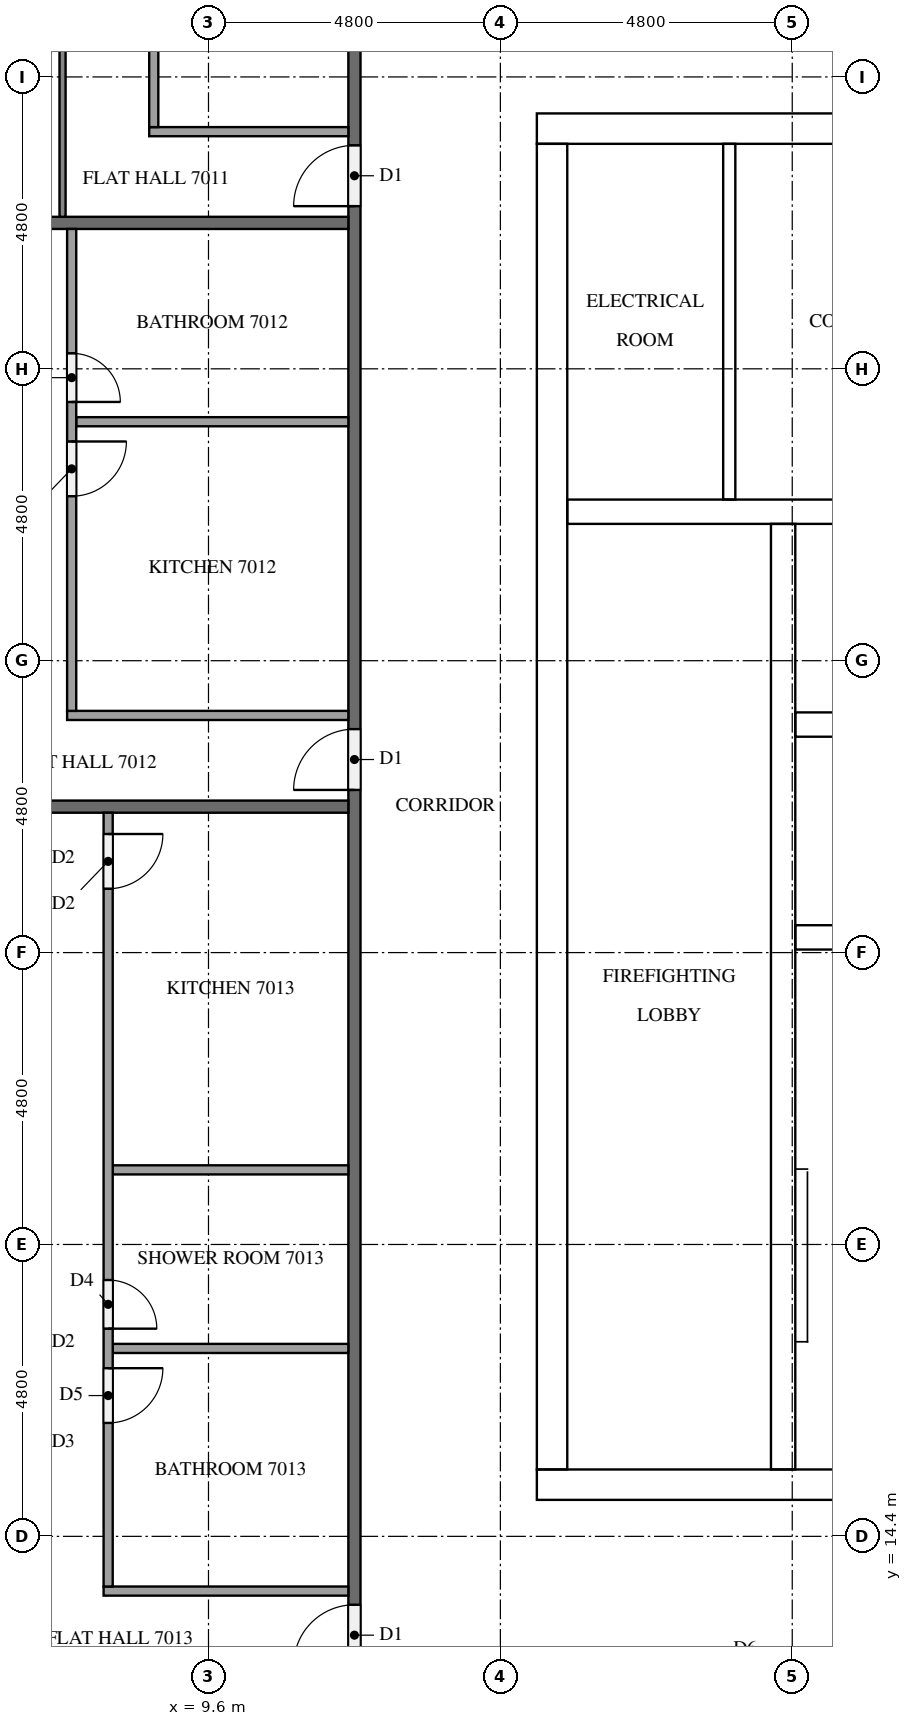
"""IFC4 building model, lengths in metres.
Left out: names, types, materials, properties, quantities, classifications, styles, units other than length and angle.
Written with IfcOpenShell. Run it as: python <this file> out.ifc"""

import sys

from ifc_helpers import new_model, si_unit, direction, frame, frame_2d, origin, place, context, subcontext, project, spatial, rectangle, extrude, element, fill, save


model = new_model("IFC4")
c1 = context("Model", 3, precision=1e-05, world=origin(), true_north=direction((0.0, 1.0)))
c2 = subcontext(c1, "Body", "Model", "MODEL_VIEW")
j1 = project(units=[si_unit("LENGTHUNIT", "METRE"), si_unit("PLANEANGLEUNIT", "RADIAN")], contexts=[c1])
p1 = place(None, origin())
s1 = spatial("IfcSite", under=j1, at=p1, CompositionType="ELEMENT")
p2 = place(p1, origin())
s2 = spatial("IfcBuilding", under=s1, at=p2, CompositionType="ELEMENT")
p3 = place(p2, frame((0.0, 0.0, 268.6)))
s3 = spatial("IfcBuildingStorey", under=s2, at=p3, CompositionType="ELEMENT", Elevation=268.6)
p4 = place(p3, frame((15.0, 15.25, 0.0), z_axis=(0.0, 0.0, 1.0), x_axis=(1.0, 0.0, 0.0)))
e1 = element("IfcWall", 1, at=p4, inside=s3, PredefinedType="SHEAR", context=c2, shape_type="SweptSolid", body=[
    extrude(rectangle(XDim=32.4, YDim=0.5, at=frame_2d((16.2, 0.0))), origin(), (0.0, 0.0, 1.0), 3.2),
])
p5 = place(p4, frame((15.3, 0.0, 0.0)))
e2 = element("IfcOpeningElement", 2, at=p5, cuts=e1, PredefinedType="OPENING", context=c2, shape_type="SweptSolid", body=[
    extrude(rectangle(XDim=1.8, YDim=2.1, at=frame_2d((0.9, 1.05))), frame((0.0, 0.26, 0.0), z_axis=(0.0, -1.0, 0.0), x_axis=(1.0, 0.0, 0.0)), (0.0, 0.0, 1.0), 0.52),
])
p6 = place(p3, frame((15.0, 37.55, 0.0), z_axis=(0.0, 0.0, 1.0), x_axis=(1.0, 0.0, 0.0)))
e3 = element("IfcWall", 3, at=p6, inside=s3, PredefinedType="SHEAR", context=c2, shape_type="SweptSolid", body=[
    extrude(rectangle(XDim=32.4, YDim=0.5, at=frame_2d((16.2, 0.0))), origin(), (0.0, 0.0, 1.0), 3.2),
])
p7 = place(p6, frame((15.3, 0.0, 0.0)))
e4 = element("IfcOpeningElement", 4, at=p7, cuts=e3, PredefinedType="OPENING", context=c2, shape_type="SweptSolid", body=[
    extrude(rectangle(XDim=1.8, YDim=2.1, at=frame_2d((0.9, 1.05))), frame((0.0, 0.26, 0.0), z_axis=(0.0, -1.0, 0.0), x_axis=(1.0, 0.0, 0.0)), (0.0, 0.0, 1.0), 0.52),
])
p8 = place(p6, frame((1.282, 0.0, 0.0)))
e5 = element("IfcOpeningElement", 5, at=p8, cuts=e3, PredefinedType="OPENING", context=c2, shape_type="SweptSolid", body=[
    extrude(rectangle(XDim=1.0, YDim=2.1, at=frame_2d((0.5, 1.05))), frame((0.0, 0.26, 0.0), z_axis=(0.0, -1.0, 0.0), x_axis=(1.0, 0.0, 0.0)), (0.0, 0.0, 1.0), 0.52),
])
p9 = place(p6, frame((5.082, 0.0, 0.0)))
e6 = element("IfcOpeningElement", 6, at=p9, cuts=e3, PredefinedType="OPENING", context=c2, shape_type="SweptSolid", body=[
    extrude(rectangle(XDim=1.0, YDim=2.1, at=frame_2d((0.5, 1.05))), frame((0.0, 0.26, 0.0), z_axis=(0.0, -1.0, 0.0), x_axis=(1.0, 0.0, 0.0)), (0.0, 0.0, 1.0), 0.52),
])
p10 = place(p3, frame((15.25, 15.5, 0.0), z_axis=(0.0, 0.0, 1.0), x_axis=(0.0, 1.0, 0.0)))
e7 = element("IfcWall", 7, at=p10, inside=s3, PredefinedType="SHEAR", context=c2, shape_type="SweptSolid", body=[
    extrude(rectangle(XDim=21.8, YDim=0.5, at=frame_2d((10.9, 0.0))), origin(), (0.0, 0.0, 1.0), 3.2),
])
p11 = place(p10, frame((5.26, 0.0, 0.0)))
e8 = element("IfcOpeningElement", 8, at=p11, cuts=e7, PredefinedType="OPENING", context=c2, shape_type="SweptSolid", body=[
    extrude(rectangle(XDim=1.2, YDim=2.1, at=frame_2d((0.6, 1.05))), frame((0.0, 0.26, 0.0), z_axis=(0.0, -1.0, 0.0), x_axis=(1.0, 0.0, 0.0)), (0.0, 0.0, 1.0), 0.52),
])
p12 = place(p3, frame((19.05, 15.5, 0.0), z_axis=(0.0, 0.0, 1.0), x_axis=(0.0, 1.0, 0.0)))
e9 = element("IfcWall", 9, at=p12, inside=s3, PredefinedType="SHEAR", context=c2, shape_type="SweptSolid", body=[
    extrude(rectangle(XDim=15.55, YDim=0.4, at=frame_2d((7.775, 0.0))), origin(), (0.0, 0.0, 1.0), 3.2),
])
p13 = place(p12, frame((9.95, 0.0, 0.0)))
e10 = element("IfcOpeningElement", 10, at=p13, cuts=e9, PredefinedType="OPENING", context=c2, shape_type="SweptSolid", body=[
    extrude(rectangle(XDim=1.1, YDim=2.1, at=frame_2d((0.55, 1.05))), frame((0.0, 0.21, 0.0), z_axis=(0.0, -1.0, 0.0), x_axis=(1.0, 0.0, 0.0)), (0.0, 0.0, 1.0), 0.42),
])
p14 = place(p12, frame((13.45, 0.0, 0.0)))
e11 = element("IfcOpeningElement", 11, at=p14, cuts=e9, PredefinedType="OPENING", context=c2, shape_type="SweptSolid", body=[
    extrude(rectangle(XDim=1.1, YDim=2.1, at=frame_2d((0.55, 1.05))), frame((0.0, 0.21, 0.0), z_axis=(0.0, -1.0, 0.0), x_axis=(1.0, 0.0, 0.0)), (0.0, 0.0, 1.0), 0.42),
])
p15 = place(p12, frame((0.7, 0.0, 0.0)))
e12 = element("IfcOpeningElement", 12, at=p15, cuts=e9, PredefinedType="OPENING", context=c2, shape_type="SweptSolid", body=[
    extrude(rectangle(XDim=1.2, YDim=2.1, at=frame_2d((0.6, 1.05))), frame((0.0, 0.21, 0.0), z_axis=(0.0, -1.0, 0.0), x_axis=(1.0, 0.0, 0.0)), (0.0, 0.0, 1.0), 0.42),
])
for number, where, z_axis, x_axis in (
    (13, (19.25, 24.25, 0.0), (0.0, 0.0, 1.0), (1.0, 0.0, 0.0)),
    (14, (19.25, 27.75, 0.0), (0.0, 0.0, 1.0), (1.0, 0.0, 0.0)),
):
    element("IfcWall", number, at=place(p3, frame(where, z_axis=z_axis, x_axis=x_axis)), inside=s3, PredefinedType="SHEAR", context=c2, shape_type="SweptSolid", body=[
        extrude(rectangle(XDim=3.65, YDim=0.4, at=frame_2d((1.825, 0.0))), origin(), (0.0, 0.0, 1.0), 3.2),
    ])
p16 = place(p3, frame((15.5, 31.25, 0.0), z_axis=(0.0, 0.0, 1.0), x_axis=(1.0, 0.0, 0.0)))
e15 = element("IfcWall", 15, at=p16, inside=s3, PredefinedType="SHEAR", context=c2, shape_type="SweptSolid", body=[
    extrude(rectangle(XDim=7.4, YDim=0.4, at=frame_2d((3.7, 0.0))), origin(), (0.0, 0.0, 1.0), 3.2),
])
p17 = place(p3, frame((18.164, 31.45, 0.0), z_axis=(0.0, 0.0, 1.0), x_axis=(0.0, 1.0, 0.0)))
e16 = element("IfcWall", 16, at=p17, inside=s3, PredefinedType="PARTITIONING", context=c2, shape_type="SweptSolid", body=[
    extrude(rectangle(XDim=5.85, YDim=0.2, at=frame_2d((2.925, 0.0))), origin(), (0.0, 0.0, 1.0), 3.2),
])
p18 = place(p3, frame((12.0, 12.1, 0.0), z_axis=(0.0, 0.0, 1.0), x_axis=(0.0, 1.0, 0.0)))
e17 = element("IfcWall", 17, at=p18, inside=s3, PredefinedType="PARTITIONING", context=c2, shape_type="SweptSolid", body=[
    extrude(rectangle(XDim=28.6, YDim=0.2, at=frame_2d((14.3, 0.0))), origin(), (0.0, 0.0, 1.0), 3.2),
])
p19 = place(p18, frame((24.175, 0.0, 0.0)))
e18 = element("IfcOpeningElement", 18, at=p19, cuts=e17, PredefinedType="OPENING", context=c2, shape_type="SweptSolid", body=[
    extrude(rectangle(XDim=1.0, YDim=2.1, at=frame_2d((0.5, 1.05))), frame((0.0, 0.11, 0.0), z_axis=(0.0, -1.0, 0.0), x_axis=(1.0, 0.0, 0.0)), (0.0, 0.0, 1.0), 0.22),
])
p20 = place(p18, frame((14.575, 0.0, 0.0)))
e19 = element("IfcOpeningElement", 19, at=p20, cuts=e17, PredefinedType="OPENING", context=c2, shape_type="SweptSolid", body=[
    extrude(rectangle(XDim=1.0, YDim=2.1, at=frame_2d((0.5, 1.05))), frame((0.0, 0.11, 0.0), z_axis=(0.0, -1.0, 0.0), x_axis=(1.0, 0.0, 0.0)), (0.0, 0.0, 1.0), 0.22),
])
p21 = place(p18, frame((0.175, 0.0, 0.0)))
e20 = element("IfcOpeningElement", 20, at=p21, cuts=e17, PredefinedType="OPENING", context=c2, shape_type="SweptSolid", body=[
    extrude(rectangle(XDim=1.0, YDim=2.1, at=frame_2d((0.5, 1.05))), frame((0.0, 0.11, 0.0), z_axis=(0.0, -1.0, 0.0), x_axis=(1.0, 0.0, 0.0)), (0.0, 0.0, 1.0), 0.22),
])
for number, where, z_axis, x_axis in (
    (21, (0.1, 36.0, 0.0), (0.0, 0.0, 1.0), (1.0, 0.0, 0.0)),
    (22, (0.1, 26.4, 0.0), (0.0, 0.0, 1.0), (1.0, 0.0, 0.0)),
):
    element("IfcWall", number, at=place(p3, frame(where, z_axis=z_axis, x_axis=x_axis)), inside=s3, PredefinedType="PARTITIONING", context=c2, shape_type="SweptSolid", body=[
        extrude(rectangle(XDim=11.8, YDim=0.2, at=frame_2d((5.9, 0.0))), origin(), (0.0, 0.0, 1.0), 3.2),
    ])
p22 = place(p3, frame((7.2, 36.1, 0.0), z_axis=(0.0, 0.0, 1.0), x_axis=(0.0, 1.0, 0.0)))
e23 = element("IfcWall", 23, at=p22, inside=s3, PredefinedType="PARTITIONING", context=c2, shape_type="SweptSolid", body=[
    extrude(rectangle(XDim=11.8, YDim=0.1, at=frame_2d((5.9, 0.0))), origin(), (0.0, 0.0, 1.0), 3.2),
])
p23 = place(p22, frame((5.75, 0.0, 0.0)))
e24 = element("IfcOpeningElement", 24, at=p23, cuts=e23, PredefinedType="OPENING", context=c2, shape_type="SweptSolid", body=[
    extrude(rectangle(XDim=1.0, YDim=2.1, at=frame_2d((0.5, 1.05))), frame((0.0, 0.06, 0.0), z_axis=(0.0, -1.0, 0.0), x_axis=(1.0, 0.0, 0.0)), (0.0, 0.0, 1.0), 0.12),
])
p24 = place(p22, frame((7.45, 0.0, 0.0)))
e25 = element("IfcOpeningElement", 25, at=p24, cuts=e23, PredefinedType="OPENING", context=c2, shape_type="SweptSolid", body=[
    extrude(rectangle(XDim=0.9, YDim=2.1, at=frame_2d((0.45, 1.05))), frame((0.0, 0.06, 0.0), z_axis=(0.0, -1.0, 0.0), x_axis=(1.0, 0.0, 0.0)), (0.0, 0.0, 1.0), 0.12),
])
p25 = place(p3, frame((11.9, 37.5, 0.0), z_axis=(0.0, 0.0, 1.0), x_axis=(-1.0, 0.0, 0.0)))
e26 = element("IfcWall", 26, at=p25, inside=s3, PredefinedType="PARTITIONING", context=c2, shape_type="SweptSolid", body=[
    extrude(rectangle(XDim=3.275, YDim=0.15, at=frame_2d((1.637, 0.0))), origin(), (0.0, 0.0, 1.0), 3.2),
])
p26 = place(p3, frame((8.7, 47.9, 0.0), z_axis=(0.0, 0.0, 1.0), x_axis=(0.0, -1.0, 0.0)))
e27 = element("IfcWall", 27, at=p26, inside=s3, PredefinedType="PARTITIONING", context=c2, shape_type="SweptSolid", body=[
    extrude(rectangle(XDim=10.325, YDim=0.15, at=frame_2d((5.163, 0.0))), origin(), (0.0, 0.0, 1.0), 3.2),
])
p27 = place(p26, frame((6.52, 0.0, 0.0)))
e28 = element("IfcOpeningElement", 28, at=p27, cuts=e27, PredefinedType="OPENING", context=c2, shape_type="SweptSolid", body=[
    extrude(rectangle(XDim=0.8, YDim=2.1, at=frame_2d((0.4, 1.05))), frame((0.0, 0.085, 0.0), z_axis=(0.0, -1.0, 0.0), x_axis=(1.0, 0.0, 0.0)), (0.0, 0.0, 1.0), 0.17),
])
p28 = place(p26, frame((4.97, 0.0, 0.0)))
e29 = element("IfcOpeningElement", 29, at=p28, cuts=e27, PredefinedType="OPENING", context=c2, shape_type="SweptSolid", body=[
    extrude(rectangle(XDim=0.9, YDim=2.1, at=frame_2d((0.45, 1.05))), frame((0.0, 0.085, 0.0), z_axis=(0.0, -1.0, 0.0), x_axis=(1.0, 0.0, 0.0)), (0.0, 0.0, 1.0), 0.17),
])
p29 = place(p3, frame((11.9, 32.73, 0.0), z_axis=(0.0, 0.0, 1.0), x_axis=(-1.0, 0.0, 0.0)))
e30 = element("IfcWall", 30, at=p29, inside=s3, PredefinedType="PARTITIONING", context=c2, shape_type="SweptSolid", body=[
    extrude(rectangle(XDim=4.475, YDim=0.15, at=frame_2d((2.237, 0.0))), origin(), (0.0, 0.0, 1.0), 3.2),
])
p30 = place(p3, frame((11.9, 27.9, 0.0), z_axis=(0.0, 0.0, 1.0), x_axis=(-1.0, 0.0, 0.0)))
e31 = element("IfcWall", 31, at=p30, inside=s3, PredefinedType="PARTITIONING", context=c2, shape_type="SweptSolid", body=[
    extrude(rectangle(XDim=4.625, YDim=0.15, at=frame_2d((2.312, 0.0))), origin(), (0.0, 0.0, 1.0), 3.2),
])
p31 = place(p3, frame((7.35, 35.9, 0.0), z_axis=(0.0, 0.0, 1.0), x_axis=(0.0, -1.0, 0.0)))
e32 = element("IfcWall", 32, at=p31, inside=s3, PredefinedType="PARTITIONING", context=c2, shape_type="SweptSolid", body=[
    extrude(rectangle(XDim=7.925, YDim=0.15, at=frame_2d((3.962, 0.0))), origin(), (0.0, 0.0, 1.0), 3.2),
])
p32 = place(p31, frame((3.495, 0.0, 0.0)))
e33 = element("IfcOpeningElement", 33, at=p32, cuts=e32, PredefinedType="OPENING", context=c2, shape_type="SweptSolid", body=[
    extrude(rectangle(XDim=0.9, YDim=2.1, at=frame_2d((0.45, 1.05))), frame((0.0, 0.085, 0.0), z_axis=(0.0, -1.0, 0.0), x_axis=(1.0, 0.0, 0.0)), (0.0, 0.0, 1.0), 0.17),
])
p33 = place(p31, frame((2.045, 0.0, 0.0)))
e34 = element("IfcOpeningElement", 34, at=p33, cuts=e32, PredefinedType="OPENING", context=c2, shape_type="SweptSolid", body=[
    extrude(rectangle(XDim=0.8, YDim=2.1, at=frame_2d((0.4, 1.05))), frame((0.0, 0.085, 0.0), z_axis=(0.0, -1.0, 0.0), x_axis=(1.0, 0.0, 0.0)), (0.0, 0.0, 1.0), 0.17),
])
for number, where, z_axis, x_axis in (
    (35, (11.9, 17.49, 0.0), (0.0, 0.0, 1.0), (-1.0, 0.0, 0.0)),
    (36, (11.9, 20.427, 0.0), (0.0, 0.0, 1.0), (-1.0, 0.0, 0.0)),
):
    element("IfcWall", number, at=place(p3, frame(where, z_axis=z_axis, x_axis=x_axis)), inside=s3, PredefinedType="PARTITIONING", context=c2, shape_type="SweptSolid", body=[
        extrude(rectangle(XDim=3.875, YDim=0.15, at=frame_2d((1.938, 0.0))), origin(), (0.0, 0.0, 1.0), 3.2),
    ])
p34 = place(p3, frame((11.9, 13.5, 0.0), z_axis=(0.0, 0.0, 1.0), x_axis=(-1.0, 0.0, 0.0)))
e37 = element("IfcWall", 37, at=p34, inside=s3, PredefinedType="PARTITIONING", context=c2, shape_type="SweptSolid", body=[
    extrude(rectangle(XDim=4.025, YDim=0.15, at=frame_2d((2.012, 0.0))), origin(), (0.0, 0.0, 1.0), 3.2),
])
p35 = place(p3, frame((7.95, 26.3, 0.0), z_axis=(0.0, 0.0, 1.0), x_axis=(0.0, -1.0, 0.0)))
e38 = element("IfcWall", 38, at=p35, inside=s3, PredefinedType="PARTITIONING", context=c2, shape_type="SweptSolid", body=[
    extrude(rectangle(XDim=12.725, YDim=0.15, at=frame_2d((6.363, 0.0))), origin(), (0.0, 0.0, 1.0), 3.2),
])
p36 = place(p35, frame((9.135, 0.0, 0.0)))
e39 = element("IfcOpeningElement", 39, at=p36, cuts=e38, PredefinedType="OPENING", context=c2, shape_type="SweptSolid", body=[
    extrude(rectangle(XDim=0.9, YDim=2.1, at=frame_2d((0.45, 1.05))), frame((0.0, 0.085, 0.0), z_axis=(0.0, -1.0, 0.0), x_axis=(1.0, 0.0, 0.0)), (0.0, 0.0, 1.0), 0.17),
])
p37 = place(p35, frame((7.685, 0.0, 0.0)))
e40 = element("IfcOpeningElement", 40, at=p37, cuts=e38, PredefinedType="OPENING", context=c2, shape_type="SweptSolid", body=[
    extrude(rectangle(XDim=0.8, YDim=2.1, at=frame_2d((0.4, 1.05))), frame((0.0, 0.085, 0.0), z_axis=(0.0, -1.0, 0.0), x_axis=(1.0, 0.0, 0.0)), (0.0, 0.0, 1.0), 0.17),
])
p38 = place(p35, frame((0.35, 0.0, 0.0)))
e41 = element("IfcOpeningElement", 41, at=p38, cuts=e38, PredefinedType="OPENING", context=c2, shape_type="SweptSolid", body=[
    extrude(rectangle(XDim=0.9, YDim=2.1, at=frame_2d((0.45, 1.05))), frame((0.0, 0.085, 0.0), z_axis=(0.0, -1.0, 0.0), x_axis=(1.0, 0.0, 0.0)), (0.0, 0.0, 1.0), 0.17),
])
p39 = place(p13, origin())
e42 = element("IfcDoor", 42, at=p39, inside=s3, OperationType="DOUBLE_DOOR_SLIDING", PredefinedType="DOOR", context=c2, shape_type="SweptSolid", body=[
    extrude(rectangle(XDim=1.1, YDim=2.1, at=frame_2d((0.55, 1.05))), frame((0.0, 0.025, 0.0), z_axis=(0.0, -1.0, 0.0), x_axis=(1.0, 0.0, 0.0)), (0.0, 0.0, 1.0), 0.05),
])
fill(e10, e42)
p40 = place(p14, origin())
e43 = element("IfcDoor", 43, at=p40, inside=s3, OperationType="DOUBLE_DOOR_SLIDING", PredefinedType="DOOR", context=c2, shape_type="SweptSolid", body=[
    extrude(rectangle(XDim=1.1, YDim=2.1, at=frame_2d((0.55, 1.05))), frame((0.0, 0.025, 0.0), z_axis=(0.0, -1.0, 0.0), x_axis=(1.0, 0.0, 0.0)), (0.0, 0.0, 1.0), 0.05),
])
fill(e11, e43)
p41 = place(p15, frame((1.2, 0.0, 0.0), z_axis=(0.0, 0.0, 1.0), x_axis=(-1.0, 0.0, 0.0)))
e44 = element("IfcDoor", 44, at=p41, inside=s3, OperationType="SINGLE_SWING_RIGHT", PredefinedType="DOOR", context=c2, shape_type="SweptSolid", body=[
    extrude(rectangle(XDim=1.2, YDim=2.1, at=frame_2d((0.6, 1.05))), frame((0.0, 0.025, 0.0), z_axis=(0.0, -1.0, 0.0), x_axis=(1.0, 0.0, 0.0)), (0.0, 0.0, 1.0), 0.05),
])
fill(e12, e44)
p42 = place(p11, frame((1.2, 0.0, 0.0), z_axis=(0.0, 0.0, 1.0), x_axis=(-1.0, 0.0, 0.0)))
e45 = element("IfcDoor", 45, at=p42, inside=s3, OperationType="SINGLE_SWING_LEFT", PredefinedType="DOOR", context=c2, shape_type="SweptSolid", body=[
    extrude(rectangle(XDim=1.2, YDim=2.1, at=frame_2d((0.6, 1.05))), frame((0.0, 0.025, 0.0), z_axis=(0.0, -1.0, 0.0), x_axis=(1.0, 0.0, 0.0)), (0.0, 0.0, 1.0), 0.05),
])
fill(e8, e45)
p43 = place(p8, origin())
e46 = element("IfcDoor", 46, at=p43, inside=s3, OperationType="SINGLE_SWING_LEFT", PredefinedType="DOOR", context=c2, shape_type="SweptSolid", body=[
    extrude(rectangle(XDim=1.0, YDim=2.1, at=frame_2d((0.5, 1.05))), frame((0.0, 0.025, 0.0), z_axis=(0.0, -1.0, 0.0), x_axis=(1.0, 0.0, 0.0)), (0.0, 0.0, 1.0), 0.05),
])
fill(e5, e46)
p44 = place(p19, origin())
e47 = element("IfcDoor", 47, at=p44, inside=s3, OperationType="SINGLE_SWING_LEFT", PredefinedType="DOOR", context=c2, shape_type="SweptSolid", body=[
    extrude(rectangle(XDim=1.0, YDim=2.1, at=frame_2d((0.5, 1.05))), frame((0.0, 0.025, 0.0), z_axis=(0.0, -1.0, 0.0), x_axis=(1.0, 0.0, 0.0)), (0.0, 0.0, 1.0), 0.05),
])
fill(e18, e47)
p45 = place(p20, origin())
e48 = element("IfcDoor", 48, at=p45, inside=s3, OperationType="SINGLE_SWING_LEFT", PredefinedType="DOOR", context=c2, shape_type="SweptSolid", body=[
    extrude(rectangle(XDim=1.0, YDim=2.1, at=frame_2d((0.5, 1.05))), frame((0.0, 0.025, 0.0), z_axis=(0.0, -1.0, 0.0), x_axis=(1.0, 0.0, 0.0)), (0.0, 0.0, 1.0), 0.05),
])
fill(e19, e48)
p46 = place(p21, origin())
e49 = element("IfcDoor", 49, at=p46, inside=s3, OperationType="SINGLE_SWING_LEFT", PredefinedType="DOOR", context=c2, shape_type="SweptSolid", body=[
    extrude(rectangle(XDim=1.0, YDim=2.1, at=frame_2d((0.5, 1.05))), frame((0.0, 0.025, 0.0), z_axis=(0.0, -1.0, 0.0), x_axis=(1.0, 0.0, 0.0)), (0.0, 0.0, 1.0), 0.05),
])
fill(e20, e49)
p47 = place(p32, origin())
e50 = element("IfcDoor", 50, at=p47, inside=s3, OperationType="SINGLE_SWING_LEFT", PredefinedType="DOOR", context=c2, shape_type="SweptSolid", body=[
    extrude(rectangle(XDim=0.9, YDim=2.1, at=frame_2d((0.45, 1.05))), frame((0.0, 0.025, 0.0), z_axis=(0.0, -1.0, 0.0), x_axis=(1.0, 0.0, 0.0)), (0.0, 0.0, 1.0), 0.05),
])
fill(e33, e50)
p48 = place(p33, origin())
e51 = element("IfcDoor", 51, at=p48, inside=s3, OperationType="SINGLE_SWING_RIGHT", PredefinedType="DOOR", context=c2, shape_type="SweptSolid", body=[
    extrude(rectangle(XDim=0.8, YDim=2.1, at=frame_2d((0.4, 1.05))), frame((0.0, 0.025, 0.0), z_axis=(0.0, -1.0, 0.0), x_axis=(1.0, 0.0, 0.0)), (0.0, 0.0, 1.0), 0.05),
])
fill(e34, e51)
p49 = place(p36, origin())
e52 = element("IfcDoor", 52, at=p49, inside=s3, OperationType="SINGLE_SWING_LEFT", PredefinedType="DOOR", context=c2, shape_type="SweptSolid", body=[
    extrude(rectangle(XDim=0.9, YDim=2.1, at=frame_2d((0.45, 1.05))), frame((0.0, 0.025, 0.0), z_axis=(0.0, -1.0, 0.0), x_axis=(1.0, 0.0, 0.0)), (0.0, 0.0, 1.0), 0.05),
])
fill(e39, e52)
p50 = place(p37, origin())
e53 = element("IfcDoor", 53, at=p50, inside=s3, OperationType="SINGLE_SWING_RIGHT", PredefinedType="DOOR", context=c2, shape_type="SweptSolid", body=[
    extrude(rectangle(XDim=0.8, YDim=2.1, at=frame_2d((0.4, 1.05))), frame((0.0, 0.025, 0.0), z_axis=(0.0, -1.0, 0.0), x_axis=(1.0, 0.0, 0.0)), (0.0, 0.0, 1.0), 0.05),
])
fill(e40, e53)
p51 = place(p38, origin())
e54 = element("IfcDoor", 54, at=p51, inside=s3, OperationType="SINGLE_SWING_LEFT", PredefinedType="DOOR", context=c2, shape_type="SweptSolid", body=[
    extrude(rectangle(XDim=0.9, YDim=2.1, at=frame_2d((0.45, 1.05))), frame((0.0, 0.025, 0.0), z_axis=(0.0, -1.0, 0.0), x_axis=(1.0, 0.0, 0.0)), (0.0, 0.0, 1.0), 0.05),
])
fill(e41, e54)
save(model, sys.argv[1])
